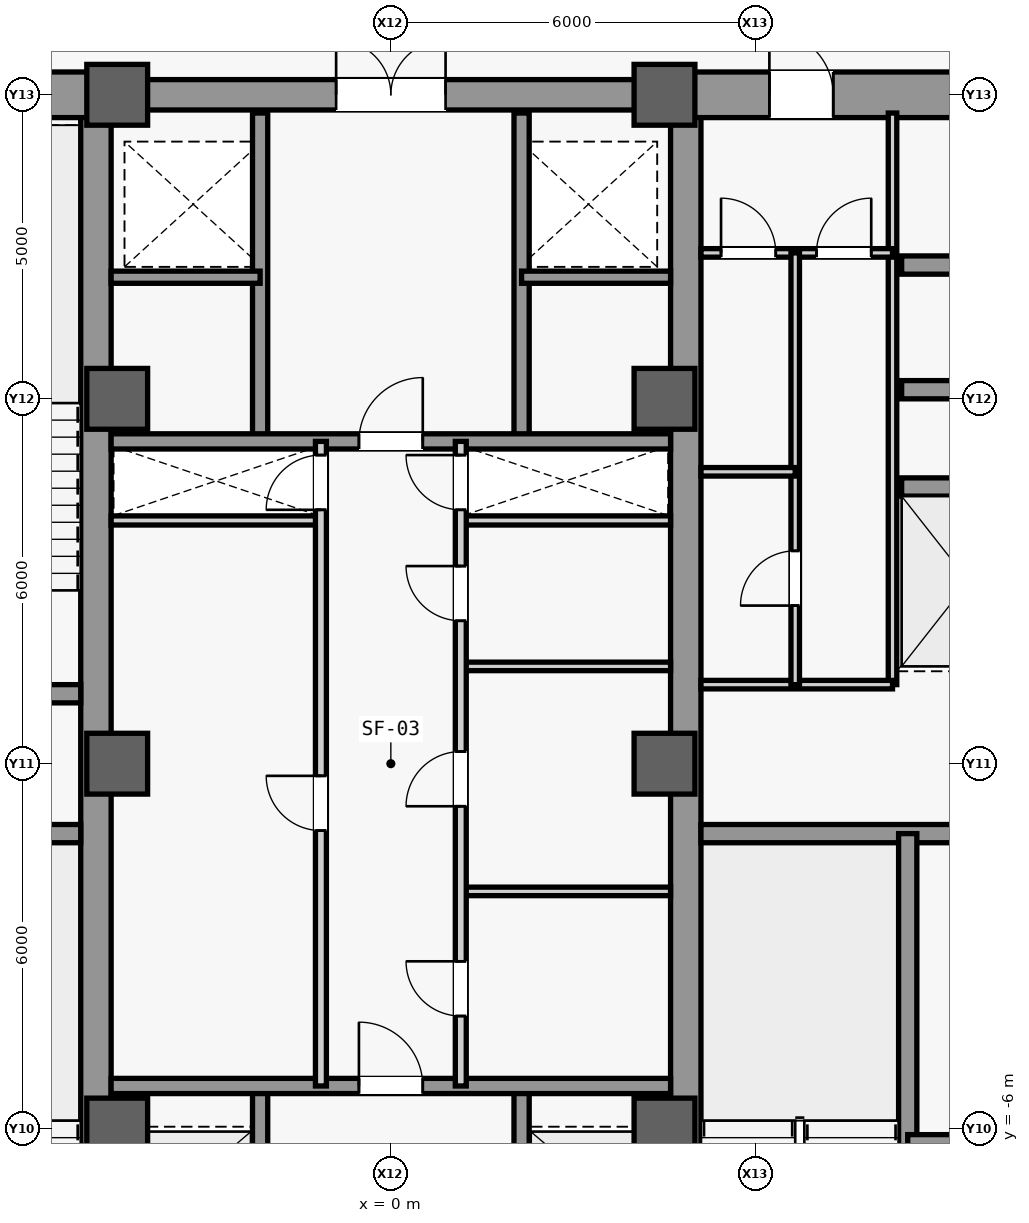
"""IFC4 building model, lengths in metres.
Left out: names, types, materials, properties, quantities, classifications, styles, units other than length and angle.
Written with IfcOpenShell. Run it as: python <this file> out.ifc"""

import sys

from ifc_helpers import new_model, si_unit, direction, frame, frame_2d, origin, origin_2d, place, context, subcontext, project, spatial, rectangle, extrude, source, transform, mapped, element, fill, save


model = new_model("IFC4")
c1 = context("Model", 3, precision=1e-05, world=origin(), true_north=direction((0.0, 1.0)))
c2 = subcontext(c1, "Body", "Model", "MODEL_VIEW")
j1 = project(units=[si_unit("LENGTHUNIT", "METRE"), si_unit("PLANEANGLEUNIT", "RADIAN")], contexts=[c1])
p1 = place(None, origin())
s1 = spatial("IfcSite", under=j1, at=p1, CompositionType="ELEMENT")
p2 = place(p1, origin())
s2 = spatial("IfcBuilding", under=s1, at=p2, CompositionType="ELEMENT")
p3 = place(p2, frame((0.0, 0.0, 140.6)))
s3 = spatial("IfcBuildingStorey", under=s2, at=p3, CompositionType="ELEMENT", Elevation=140.6)
m1 = source(origin(), c2, "Body", "SweptSolid", [
    extrude(rectangle(XDim=21.4, YDim=0.5, at=frame_2d((10.7, 0.0))), origin(), (0.0, 0.0, 1.0), 3.84),
])
for number, where, z_axis, x_axis in (
    (1, (-4.85, -10.7, 0.0), (0.0, 0.0, 1.0), (0.0, 1.0, 0.0)),
    (2, (4.85, -10.7, 0.0), (0.0, 0.0, 1.0), (0.0, 1.0, 0.0)),
):
    element("IfcWall", number, at=place(p3, frame(where, z_axis=z_axis, x_axis=x_axis)), inside=s3, PredefinedType="SHEAR", context=c2, shape_type="MappedRepresentation", body=[
        mapped(m1, transform((0.0, 0.0, 0.0), scale=1.0)),
    ])
m2 = source(origin(), c2, "Body", "SweptSolid", [
    extrude(rectangle(XDim=5.85, YDim=0.75, at=frame_2d((2.925, 0.0))), origin(), (0.0, 0.0, 1.0), 3.84),
])
p4 = place(p3, frame((-10.7, 11.0, 0.0), z_axis=(0.0, 0.0, 1.0), x_axis=(1.0, 0.0, 0.0)))
e3 = element("IfcWall", 3, at=p4, inside=s3, PredefinedType="SHEAR", context=c2, shape_type="MappedRepresentation", body=[
    mapped(m2, transform((0.0, 0.0, 0.0), scale=1.0)),
])
p5 = place(p3, frame((4.85, 11.0, 0.0), z_axis=(0.0, 0.0, 1.0), x_axis=(1.0, 0.0, 0.0)))
e4 = element("IfcWall", 4, at=p5, inside=s3, PredefinedType="SHEAR", context=c2, shape_type="MappedRepresentation", body=[
    mapped(m2, transform((0.0, 0.0, 0.0), scale=1.0)),
])
m3 = source(origin(), c2, "Body", "SweptSolid", [
    extrude(rectangle(XDim=1.05, YDim=2.2, at=frame_2d((0.525, 1.1))), frame((0.0, 0.385, 0.0), z_axis=(0.0, -1.0, 0.0), x_axis=(1.0, 0.0, 0.0)), (0.0, 0.0, 1.0), 0.77),
])
p6 = place(p5, frame((1.375, 0.0, 0.0)))
e5 = element("IfcOpeningElement", 5, at=p6, cuts=e4, PredefinedType="OPENING", context=c2, shape_type="MappedRepresentation", body=[
    mapped(m3, transform((0.0, 0.0, 0.0), scale=1.0)),
])
m4 = source(origin(), c2, "Body", "SweptSolid", [
    extrude(rectangle(XDim=5.6, YDim=0.3, at=frame_2d((2.8, 0.0))), origin(), (0.0, 0.0, 1.0), 3.84),
])
for number, where, z_axis, x_axis in (
    (6, (-10.7, -1.15, 0.0), (0.0, 0.0, 1.0), (1.0, 0.0, 0.0)),
    (7, (-10.7, 1.15, 0.0), (0.0, 0.0, 1.0), (1.0, 0.0, 0.0)),
    (8, (5.1, -1.15, 0.0), (0.0, 0.0, 1.0), (1.0, 0.0, 0.0)),
):
    element("IfcWall", number, at=place(p3, frame(where, z_axis=z_axis, x_axis=x_axis)), inside=s3, PredefinedType="SHEAR", context=c2, shape_type="MappedRepresentation", body=[
        mapped(m4, transform((0.0, 0.0, 0.0), scale=1.0)),
    ])
m5 = source(origin(), c2, "Body", "SweptSolid", [
    extrude(rectangle(XDim=9.2, YDim=0.5, at=frame_2d((4.6, 0.0))), origin(), (0.0, 0.0, 1.0), 3.84),
])
p7 = place(p3, frame((-4.6, 11.0, 0.0), z_axis=(0.0, 0.0, 1.0), x_axis=(1.0, 0.0, 0.0)))
e9 = element("IfcWall", 9, at=p7, inside=s3, PredefinedType="SHEAR", context=c2, shape_type="MappedRepresentation", body=[
    mapped(m5, transform((0.0, 0.0, 0.0), scale=1.0)),
])
m6 = source(origin(), c2, "Body", "SweptSolid", [
    extrude(rectangle(XDim=1.8, YDim=2.25, at=frame_2d((0.9, 1.125))), frame((0.0, 0.26, 0.0), z_axis=(0.0, -1.0, 0.0), x_axis=(1.0, 0.0, 0.0)), (0.0, 0.0, 1.0), 0.52),
])
p8 = place(p7, frame((3.7, 0.0, 0.0)))
e10 = element("IfcOpeningElement", 10, at=p8, cuts=e9, PredefinedType="OPENING", context=c2, shape_type="MappedRepresentation", body=[
    mapped(m6, transform((0.0, 0.0, 0.0), scale=1.0)),
])
m7 = source(origin(), c2, "Body", "SweptSolid", [
    extrude(rectangle(XDim=1.0, YDim=1.0, at=origin_2d()), origin(), (0.0, 0.0, 1.0), 4.1),
])
for number, where, z_axis, x_axis in (
    (11, (-4.5, -6.0, 0.0), (0.0, 0.0, 1.0), (1.0, 0.0, 0.0)),
    (12, (-4.5, 0.0, 0.0), (0.0, 0.0, 1.0), (1.0, 0.0, 0.0)),
    (13, (-4.5, 6.0, 0.0), (0.0, 0.0, 1.0), (1.0, 0.0, 0.0)),
    (14, (-4.5, 11.0, 0.0), (0.0, 0.0, 1.0), (1.0, 0.0, 0.0)),
    (15, (4.5, -6.0, 0.0), (0.0, 0.0, 1.0), (1.0, 0.0, 0.0)),
    (16, (4.5, 0.0, 0.0), (0.0, 0.0, 1.0), (1.0, 0.0, 0.0)),
    (17, (4.5, 6.0, 0.0), (0.0, 0.0, 1.0), (1.0, 0.0, 0.0)),
    (18, (4.5, 11.0, 0.0), (0.0, 0.0, 1.0), (1.0, 0.0, 0.0)),
):
    element("IfcColumn", number, at=place(p3, frame(where, z_axis=z_axis, x_axis=x_axis)), inside=s3, PredefinedType="COLUMN", context=c2, shape_type="MappedRepresentation", body=[
        mapped(m7, transform((0.0, 0.0, 0.0), scale=1.0)),
    ])
m8 = source(origin(), c2, "Body", "SweptSolid", [
    extrude(rectangle(XDim=7.8, YDim=0.3, at=frame_2d((3.9, 0.0))), origin(), (0.0, 0.0, 1.0), 3.84),
])
p9 = place(p3, frame((8.5, -8.95, 0.0), z_axis=(0.0, 0.0, 1.0), x_axis=(0.0, 1.0, 0.0)))
e19 = element("IfcWall", 19, at=p9, inside=s3, PredefinedType="SHEAR", context=c2, shape_type="MappedRepresentation", body=[
    mapped(m8, transform((0.0, 0.0, 0.0), scale=1.0)),
])
m9 = source(origin(), c2, "Body", "SweptSolid", [
    extrude(rectangle(XDim=2.2, YDim=0.3, at=frame_2d((1.1, 0.0))), origin(), (0.0, 0.0, 1.0), 3.84),
])
p10 = place(p3, frame((8.5, -6.25, 0.0), z_axis=(0.0, 0.0, 1.0), x_axis=(1.0, 0.0, 0.0)))
e20 = element("IfcWall", 20, at=p10, inside=s3, PredefinedType="SHEAR", context=c2, shape_type="MappedRepresentation", body=[
    mapped(m9, transform((0.0, 0.0, 0.0), scale=1.0)),
])
m10 = source(origin(), c2, "Body", "SweptSolid", [
    extrude(rectangle(XDim=2.3, YDim=0.3, at=frame_2d((1.15, 0.0))), origin(), (0.0, 0.0, 1.0), 3.84),
])
for number, where, z_axis, x_axis in (
    (21, (8.4, 4.55, 0.0), (0.0, 0.0, 1.0), (1.0, 0.0, 0.0)),
    (22, (8.4, 6.15, 0.0), (0.0, 0.0, 1.0), (1.0, 0.0, 0.0)),
    (23, (8.4, 8.2, 0.0), (0.0, 0.0, 1.0), (1.0, 0.0, 0.0)),
):
    element("IfcWall", number, at=place(p3, frame(where, z_axis=z_axis, x_axis=x_axis)), inside=s3, PredefinedType="SHEAR", context=c2, shape_type="MappedRepresentation", body=[
        mapped(m10, transform((0.0, 0.0, 0.0), scale=1.0)),
    ])
m11 = source(origin(), c2, "Body", "SweptSolid", [
    extrude(rectangle(XDim=9.4, YDim=0.14, at=frame_2d((4.7, 0.0))), origin(), (0.0, 0.0, 1.0), 3.84),
])
p11 = place(p3, frame((8.25, 1.3, 0.0), z_axis=(0.0, 0.0, 1.0), x_axis=(0.0, 1.0, 0.0)))
e24 = element("IfcWall", 24, at=p11, inside=s3, PredefinedType="PARTITIONING", context=c2, shape_type="MappedRepresentation", body=[
    mapped(m11, transform((0.0, 0.0, 0.0), scale=1.0)),
])
m12 = source(origin(), c2, "Body", "SweptSolid", [
    extrude(rectangle(XDim=3.15, YDim=0.14, at=frame_2d((1.575, 0.0))), origin(), (0.0, 0.0, 1.0), 3.84),
])
p12 = place(p3, frame((5.1, 1.3, 0.0), z_axis=(0.0, 0.0, 1.0), x_axis=(1.0, 0.0, 0.0)))
e25 = element("IfcWall", 25, at=p12, inside=s3, PredefinedType="PARTITIONING", context=c2, shape_type="MappedRepresentation", body=[
    mapped(m12, transform((0.0, 0.0, 0.0), scale=1.0)),
])
p13 = place(p3, frame((5.1, 8.4, 0.0), z_axis=(0.0, 0.0, 1.0), x_axis=(1.0, 0.0, 0.0)))
e26 = element("IfcWall", 26, at=p13, inside=s3, PredefinedType="PARTITIONING", context=c2, shape_type="MappedRepresentation", body=[
    mapped(m12, transform((0.0, 0.0, 0.0), scale=1.0)),
])
m13 = source(origin(), c2, "Body", "SweptSolid", [
    extrude(rectangle(XDim=0.9, YDim=2.15, at=frame_2d((0.45, 1.075))), frame((0.0, 0.08, 0.0), z_axis=(0.0, -1.0, 0.0), x_axis=(1.0, 0.0, 0.0)), (0.0, 0.0, 1.0), 0.16),
])
p14 = place(p13, frame((0.33, 0.0, 0.0)))
e27 = element("IfcOpeningElement", 27, at=p14, cuts=e26, PredefinedType="OPENING", context=c2, shape_type="MappedRepresentation", body=[
    mapped(m13, transform((0.0, 0.0, 0.0), scale=1.0)),
])
p15 = place(p13, frame((1.9, 0.0, 0.0)))
e28 = element("IfcOpeningElement", 28, at=p15, cuts=e26, PredefinedType="OPENING", context=c2, shape_type="MappedRepresentation", body=[
    mapped(m13, transform((0.0, 0.0, 0.0), scale=1.0)),
])
m14 = source(origin(), c2, "Body", "SweptSolid", [
    extrude(rectangle(XDim=7.1, YDim=0.14, at=frame_2d((3.55, 0.0))), origin(), (0.0, 0.0, 1.0), 3.84),
])
p16 = place(p3, frame((6.65, 1.3, 0.0), z_axis=(0.0, 0.0, 1.0), x_axis=(0.0, 1.0, 0.0)))
e29 = element("IfcWall", 29, at=p16, inside=s3, PredefinedType="PARTITIONING", context=c2, shape_type="MappedRepresentation", body=[
    mapped(m14, transform((0.0, 0.0, 0.0), scale=1.0)),
])
p17 = place(p16, frame((1.3, 0.0, 0.0)))
e30 = element("IfcOpeningElement", 30, at=p17, cuts=e29, PredefinedType="OPENING", context=c2, shape_type="MappedRepresentation", body=[
    mapped(m13, transform((0.0, 0.0, 0.0), scale=1.0)),
])
m15 = source(origin(), c2, "Body", "SweptSolid", [
    extrude(rectangle(XDim=1.55, YDim=0.14, at=frame_2d((0.775, 0.0))), origin(), (0.0, 0.0, 1.0), 3.84),
])
p18 = place(p3, frame((5.1, 4.8, 0.0), z_axis=(0.0, 0.0, 1.0), x_axis=(1.0, 0.0, 0.0)))
e31 = element("IfcWall", 31, at=p18, inside=s3, PredefinedType="PARTITIONING", context=c2, shape_type="MappedRepresentation", body=[
    mapped(m15, transform((0.0, 0.0, 0.0), scale=1.0)),
])
m16 = source(origin(), c2, "Body", "SweptSolid", [
    extrude(rectangle(XDim=3.45, YDim=0.15, at=frame_2d((1.725, 0.0))), origin(), (0.0, 0.0, 1.0), 3.84),
])
for number, where, z_axis, x_axis in (
    (32, (-4.6, 4.0, 0.0), (0.0, 0.0, 1.0), (1.0, 0.0, 0.0)),
    (33, (1.15, 4.0, 0.0), (0.0, 0.0, 1.0), (1.0, 0.0, 0.0)),
):
    element("IfcWall", number, at=place(p3, frame(where, z_axis=z_axis, x_axis=x_axis)), inside=s3, PredefinedType="PARTITIONING", context=c2, shape_type="MappedRepresentation", body=[
        mapped(m16, transform((0.0, 0.0, 0.0), scale=1.0)),
    ])
m17 = source(origin(), c2, "Body", "SweptSolid", [
    extrude(rectangle(XDim=5.4, YDim=0.25, at=frame_2d((2.7, 0.0))), origin(), (0.0, 0.0, 1.0), 3.84),
])
p19 = place(p3, frame((-2.15, -10.7, 0.0), z_axis=(0.0, 0.0, 1.0), x_axis=(0.0, 1.0, 0.0)))
e34 = element("IfcWall", 34, at=p19, inside=s3, PredefinedType="SHEAR", context=c2, shape_type="MappedRepresentation", body=[
    mapped(m17, transform((0.0, 0.0, 0.0), scale=1.0)),
])
m18 = source(origin(), c2, "Body", "SweptSolid", [
    extrude(rectangle(XDim=1.2, YDim=2.3, at=frame_2d((0.6, 1.15))), frame((0.0, 0.135, 0.0), z_axis=(0.0, -1.0, 0.0), x_axis=(1.0, 0.0, 0.0)), (0.0, 0.0, 1.0), 0.27),
])
p20 = place(p19, frame((0.9, 0.0, 0.0)))
e35 = element("IfcOpeningElement", 35, at=p20, cuts=e34, PredefinedType="OPENING", context=c2, shape_type="MappedRepresentation", body=[
    mapped(m18, transform((0.0, 0.0, 0.0), scale=1.0)),
])
p21 = place(p19, frame((3.2, 0.0, 0.0)))
e36 = element("IfcOpeningElement", 36, at=p21, cuts=e34, PredefinedType="OPENING", context=c2, shape_type="MappedRepresentation", body=[
    mapped(m18, transform((0.0, 0.0, 0.0), scale=1.0)),
])
p22 = place(p3, frame((2.15, -10.7, 0.0), z_axis=(0.0, 0.0, 1.0), x_axis=(0.0, 1.0, 0.0)))
e37 = element("IfcWall", 37, at=p22, inside=s3, PredefinedType="SHEAR", context=c2, shape_type="MappedRepresentation", body=[
    mapped(m17, transform((0.0, 0.0, 0.0), scale=1.0)),
])
p23 = place(p22, frame((0.9, 0.0, 0.0)))
e38 = element("IfcOpeningElement", 38, at=p23, cuts=e37, PredefinedType="OPENING", context=c2, shape_type="MappedRepresentation", body=[
    mapped(m18, transform((0.0, 0.0, 0.0), scale=1.0)),
])
p24 = place(p22, frame((3.2, 0.0, 0.0)))
e39 = element("IfcOpeningElement", 39, at=p24, cuts=e37, PredefinedType="OPENING", context=c2, shape_type="MappedRepresentation", body=[
    mapped(m18, transform((0.0, 0.0, 0.0), scale=1.0)),
])
m19 = source(origin(), c2, "Body", "SweptSolid", [
    extrude(rectangle(XDim=9.2, YDim=0.25, at=frame_2d((4.6, 0.0))), origin(), (0.0, 0.0, 1.0), 3.84),
])
p25 = place(p3, frame((-4.6, -5.3, 0.0), z_axis=(0.0, 0.0, 1.0), x_axis=(1.0, 0.0, 0.0)))
e40 = element("IfcWall", 40, at=p25, inside=s3, PredefinedType="SHEAR", context=c2, shape_type="MappedRepresentation", body=[
    mapped(m19, transform((0.0, 0.0, 0.0), scale=1.0)),
])
m20 = source(origin(), c2, "Body", "SweptSolid", [
    extrude(rectangle(XDim=1.05, YDim=2.2, at=frame_2d((0.525, 1.1))), frame((0.0, 0.135, 0.0), z_axis=(0.0, -1.0, 0.0), x_axis=(1.0, 0.0, 0.0)), (0.0, 0.0, 1.0), 0.27),
])
p26 = place(p25, frame((4.075, 0.0, 0.0)))
e41 = element("IfcOpeningElement", 41, at=p26, cuts=e40, PredefinedType="OPENING", context=c2, shape_type="MappedRepresentation", body=[
    mapped(m20, transform((0.0, 0.0, 0.0), scale=1.0)),
])
for number, where, z_axis, x_axis in (
    (42, (-2.15, 5.3, 0.0), (0.0, 0.0, 1.0), (0.0, 1.0, 0.0)),
    (43, (2.15, 5.3, 0.0), (0.0, 0.0, 1.0), (0.0, 1.0, 0.0)),
):
    element("IfcWall", number, at=place(p3, frame(where, z_axis=z_axis, x_axis=x_axis)), inside=s3, PredefinedType="SHEAR", context=c2, shape_type="MappedRepresentation", body=[
        mapped(m17, transform((0.0, 0.0, 0.0), scale=1.0)),
    ])
m21 = source(origin(), c2, "Body", "SweptSolid", [
    extrude(rectangle(XDim=2.45, YDim=0.2, at=frame_2d((1.225, 0.0))), origin(), (0.0, 0.0, 1.0), 3.84),
])
for number, where, z_axis, x_axis in (
    (44, (-4.6, 8.0, 0.0), (0.0, 0.0, 1.0), (1.0, 0.0, 0.0)),
    (45, (2.15, 8.0, 0.0), (0.0, 0.0, 1.0), (1.0, 0.0, 0.0)),
):
    element("IfcWall", number, at=place(p3, frame(where, z_axis=z_axis, x_axis=x_axis)), inside=s3, PredefinedType="SHEAR", context=c2, shape_type="MappedRepresentation", body=[
        mapped(m21, transform((0.0, 0.0, 0.0), scale=1.0)),
    ])
p27 = place(p3, frame((-4.6, 5.3, 0.0), z_axis=(0.0, 0.0, 1.0), x_axis=(1.0, 0.0, 0.0)))
e46 = element("IfcWall", 46, at=p27, inside=s3, PredefinedType="SHEAR", context=c2, shape_type="MappedRepresentation", body=[
    mapped(m19, transform((0.0, 0.0, 0.0), scale=1.0)),
])
p28 = place(p27, frame((4.075, 0.0, 0.0)))
e47 = element("IfcOpeningElement", 47, at=p28, cuts=e46, PredefinedType="OPENING", context=c2, shape_type="MappedRepresentation", body=[
    mapped(m20, transform((0.0, 0.0, 0.0), scale=1.0)),
])
m22 = source(origin(), c2, "Body", "SweptSolid", [
    extrude(rectangle(XDim=10.6, YDim=0.18, at=frame_2d((5.3, 0.0))), origin(), (0.0, 0.0, 1.0), 3.84),
])
p29 = place(p3, frame((-1.15, -5.3, 0.0), z_axis=(0.0, 0.0, 1.0), x_axis=(0.0, 1.0, 0.0)))
e48 = element("IfcWall", 48, at=p29, inside=s3, PredefinedType="PARTITIONING", context=c2, shape_type="MappedRepresentation", body=[
    mapped(m22, transform((0.0, 0.0, 0.0), scale=1.0)),
])
m23 = source(origin(), c2, "Body", "SweptSolid", [
    extrude(rectangle(XDim=0.9, YDim=2.15, at=frame_2d((0.45, 1.075))), frame((0.0, 0.1, 0.0), z_axis=(0.0, -1.0, 0.0), x_axis=(1.0, 0.0, 0.0)), (0.0, 0.0, 1.0), 0.2),
])
p30 = place(p29, frame((4.2, 0.0, 0.0)))
e49 = element("IfcOpeningElement", 49, at=p30, cuts=e48, PredefinedType="OPENING", context=c2, shape_type="MappedRepresentation", body=[
    mapped(m23, transform((0.0, 0.0, 0.0), scale=1.0)),
])
p31 = place(p29, frame((9.475, 0.0, 0.0)))
e50 = element("IfcOpeningElement", 50, at=p31, cuts=e48, PredefinedType="OPENING", context=c2, shape_type="MappedRepresentation", body=[
    mapped(m23, transform((0.0, 0.0, 0.0), scale=1.0)),
])
m24 = source(origin(), c2, "Body", "SweptSolid", [
    extrude(rectangle(XDim=3.45, YDim=0.14, at=frame_2d((1.725, 0.0))), origin(), (0.0, 0.0, 1.0), 3.84),
])
for number, where, z_axis, x_axis in (
    (51, (1.15, -2.1, 0.0), (0.0, 0.0, 1.0), (1.0, 0.0, 0.0)),
    (52, (1.15, 1.6, 0.0), (0.0, 0.0, 1.0), (1.0, 0.0, 0.0)),
):
    element("IfcWall", number, at=place(p3, frame(where, z_axis=z_axis, x_axis=x_axis)), inside=s3, PredefinedType="PARTITIONING", context=c2, shape_type="MappedRepresentation", body=[
        mapped(m24, transform((0.0, 0.0, 0.0), scale=1.0)),
    ])
p32 = place(p3, frame((1.15, -5.3, 0.0), z_axis=(0.0, 0.0, 1.0), x_axis=(0.0, 1.0, 0.0)))
e53 = element("IfcWall", 53, at=p32, inside=s3, PredefinedType="PARTITIONING", context=c2, shape_type="MappedRepresentation", body=[
    mapped(m22, transform((0.0, 0.0, 0.0), scale=1.0)),
])
p33 = place(p32, frame((1.15, 0.0, 0.0)))
e54 = element("IfcOpeningElement", 54, at=p33, cuts=e53, PredefinedType="OPENING", context=c2, shape_type="MappedRepresentation", body=[
    mapped(m23, transform((0.0, 0.0, 0.0), scale=1.0)),
])
p34 = place(p32, frame((4.6, 0.0, 0.0)))
e55 = element("IfcOpeningElement", 55, at=p34, cuts=e53, PredefinedType="OPENING", context=c2, shape_type="MappedRepresentation", body=[
    mapped(m23, transform((0.0, 0.0, 0.0), scale=1.0)),
])
p35 = place(p32, frame((7.65, 0.0, 0.0)))
e56 = element("IfcOpeningElement", 56, at=p35, cuts=e53, PredefinedType="OPENING", context=c2, shape_type="MappedRepresentation", body=[
    mapped(m23, transform((0.0, 0.0, 0.0), scale=1.0)),
])
p36 = place(p32, frame((9.475, 0.0, 0.0)))
e57 = element("IfcOpeningElement", 57, at=p36, cuts=e53, PredefinedType="OPENING", context=c2, shape_type="MappedRepresentation", body=[
    mapped(m23, transform((0.0, 0.0, 0.0), scale=1.0)),
])
m25 = source(origin(), c2, "Body", "SweptSolid", [
    extrude(rectangle(XDim=1.05, YDim=2.2, at=frame_2d((0.525, 1.1))), frame((0.0, 0.025, 0.0), z_axis=(0.0, -1.0, 0.0), x_axis=(1.0, 0.0, 0.0)), (0.0, 0.0, 1.0), 0.05),
])
p37 = place(p6, origin())
e58 = element("IfcDoor", 58, at=p37, inside=s3, OperationType="SINGLE_SWING_LEFT", PredefinedType="DOOR", context=c2, shape_type="MappedRepresentation", body=[
    mapped(m25, transform((0.0, 0.0, 0.0), scale=1.0)),
])
fill(e5, e58)
m26 = source(origin(), c2, "Body", "SweptSolid", [
    extrude(rectangle(XDim=0.9, YDim=2.15, at=frame_2d((0.45, 1.075))), frame((0.0, 0.025, 0.0), z_axis=(0.0, -1.0, 0.0), x_axis=(1.0, 0.0, 0.0)), (0.0, 0.0, 1.0), 0.05),
])
p38 = place(p14, origin())
e59 = element("IfcDoor", 59, at=p38, inside=s3, OperationType="SINGLE_SWING_LEFT", PredefinedType="DOOR", context=c2, shape_type="MappedRepresentation", body=[
    mapped(m26, transform((0.0, 0.0, 0.0), scale=1.0)),
])
fill(e27, e59)
p39 = place(p15, origin())
e60 = element("IfcDoor", 60, at=p39, inside=s3, OperationType="SINGLE_SWING_RIGHT", PredefinedType="DOOR", context=c2, shape_type="MappedRepresentation", body=[
    mapped(m26, transform((0.0, 0.0, 0.0), scale=1.0)),
])
fill(e28, e60)
p40 = place(p17, origin())
e61 = element("IfcDoor", 61, at=p40, inside=s3, OperationType="SINGLE_SWING_LEFT", PredefinedType="DOOR", context=c2, shape_type="MappedRepresentation", body=[
    mapped(m26, transform((0.0, 0.0, 0.0), scale=1.0)),
])
fill(e30, e61)
p41 = place(p26, origin())
e62 = element("IfcDoor", 62, at=p41, inside=s3, OperationType="SINGLE_SWING_LEFT", PredefinedType="DOOR", context=c2, shape_type="MappedRepresentation", body=[
    mapped(m25, transform((0.0, 0.0, 0.0), scale=1.0)),
])
fill(e41, e62)
p42 = place(p28, origin())
e63 = element("IfcDoor", 63, at=p42, inside=s3, OperationType="SINGLE_SWING_RIGHT", PredefinedType="DOOR", context=c2, shape_type="MappedRepresentation", body=[
    mapped(m25, transform((0.0, 0.0, 0.0), scale=1.0)),
])
fill(e47, e63)
m27 = source(origin(), c2, "Body", "SweptSolid", [
    extrude(rectangle(XDim=1.8, YDim=2.25, at=frame_2d((0.9, 1.125))), frame((0.0, 0.025, 0.0), z_axis=(0.0, -1.0, 0.0), x_axis=(1.0, 0.0, 0.0)), (0.0, 0.0, 1.0), 0.05),
])
p43 = place(p8, origin())
e64 = element("IfcDoor", 64, at=p43, inside=s3, OperationType="SINGLE_SWING_RIGHT", PredefinedType="DOOR", context=c2, shape_type="MappedRepresentation", body=[
    mapped(m27, transform((0.0, 0.0, 0.0), scale=1.0)),
])
fill(e10, e64)
p44 = place(p30, origin())
e65 = element("IfcDoor", 65, at=p44, inside=s3, OperationType="SINGLE_SWING_RIGHT", PredefinedType="DOOR", context=c2, shape_type="MappedRepresentation", body=[
    mapped(m26, transform((0.0, 0.0, 0.0), scale=1.0)),
])
fill(e49, e65)
p45 = place(p33, origin())
e66 = element("IfcDoor", 66, at=p45, inside=s3, OperationType="SINGLE_SWING_RIGHT", PredefinedType="DOOR", context=c2, shape_type="MappedRepresentation", body=[
    mapped(m26, transform((0.0, 0.0, 0.0), scale=1.0)),
])
fill(e54, e66)
p46 = place(p34, origin())
e67 = element("IfcDoor", 67, at=p46, inside=s3, OperationType="SINGLE_SWING_LEFT", PredefinedType="DOOR", context=c2, shape_type="MappedRepresentation", body=[
    mapped(m26, transform((0.0, 0.0, 0.0), scale=1.0)),
])
fill(e55, e67)
p47 = place(p35, origin())
e68 = element("IfcDoor", 68, at=p47, inside=s3, OperationType="SINGLE_SWING_RIGHT", PredefinedType="DOOR", context=c2, shape_type="MappedRepresentation", body=[
    mapped(m26, transform((0.0, 0.0, 0.0), scale=1.0)),
])
fill(e56, e68)
p48 = place(p31, origin())
e69 = element("IfcDoor", 69, at=p48, inside=s3, OperationType="SINGLE_SWING_LEFT", PredefinedType="DOOR", context=c2, shape_type="MappedRepresentation", body=[
    mapped(m26, transform((0.0, 0.0, 0.0), scale=1.0)),
])
fill(e50, e69)
p49 = place(p36, origin())
e70 = element("IfcDoor", 70, at=p49, inside=s3, OperationType="SINGLE_SWING_RIGHT", PredefinedType="DOOR", context=c2, shape_type="MappedRepresentation", body=[
    mapped(m26, transform((0.0, 0.0, 0.0), scale=1.0)),
])
fill(e57, e70)
save(model, sys.argv[1])
